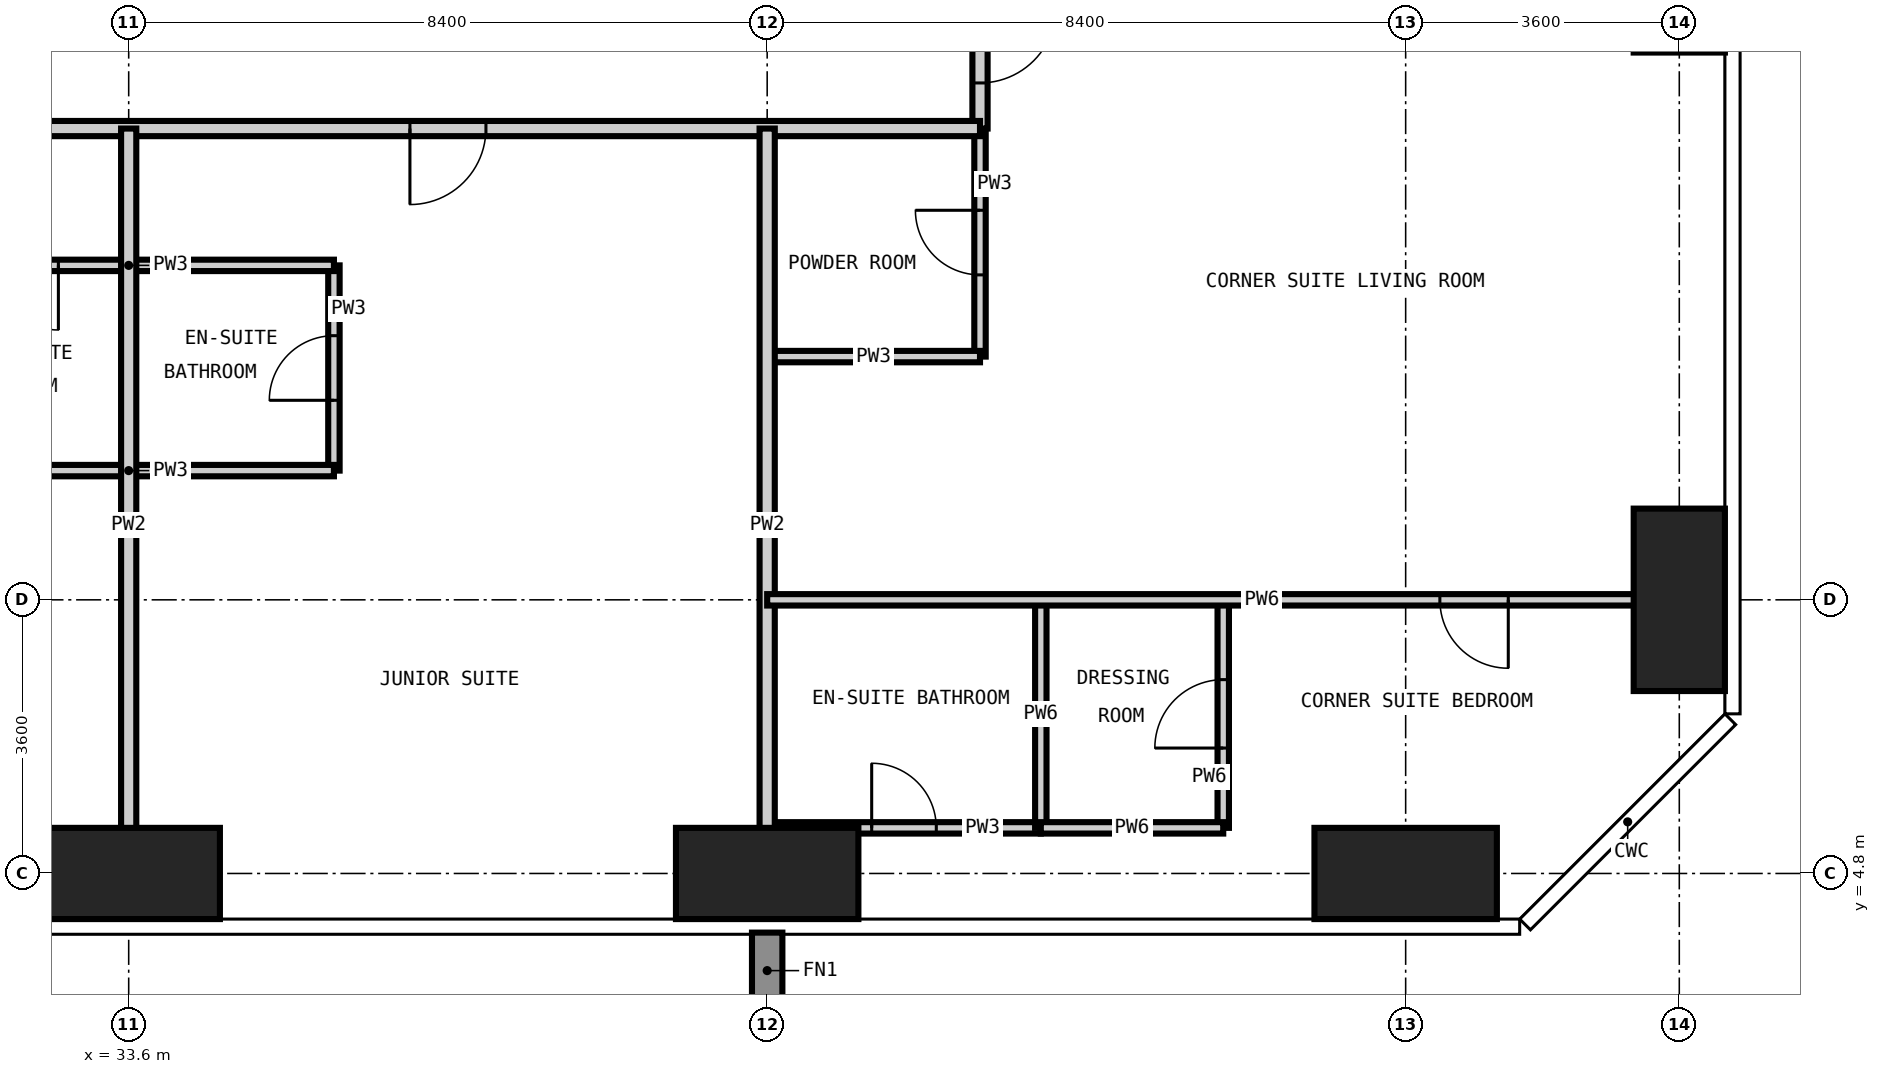
"""IFC4 building model, lengths in metres.
Left out: names, types, materials, properties, quantities, classifications, styles, units other than length and angle.
Written with IfcOpenShell. Run it as: python <this file> out.ifc"""

import sys

from ifc_helpers import new_model, si_unit, direction, frame, frame_2d, origin, origin_2d, place, context, subcontext, project, spatial, rectangle, extrude, element, fill, save


model = new_model("IFC4")
c1 = context("Model", 3, precision=1e-05, world=origin(), true_north=direction((0.0, 1.0)))
c2 = subcontext(c1, "Body", "Model", "MODEL_VIEW")
j1 = project(units=[si_unit("LENGTHUNIT", "METRE"), si_unit("PLANEANGLEUNIT", "RADIAN")], contexts=[c1])
p1 = place(None, origin())
s1 = spatial("IfcSite", under=j1, at=p1, CompositionType="ELEMENT")
p2 = place(p1, origin())
s2 = spatial("IfcBuilding", under=s1, at=p2, CompositionType="ELEMENT")
p3 = place(p2, frame((0.0, 0.0, 205.8)))
s3 = spatial("IfcBuildingStorey", under=s2, at=p3, CompositionType="ELEMENT", Elevation=205.8)
for number, where, z_axis, x_axis in (
    (1, (33.6, 4.8, -0.35), (0.0, 0.0, 1.0), (1.0, 0.0, 0.0)),
    (2, (42.0, 4.8, -0.35), (0.0, 0.0, 1.0), (1.0, 0.0, 0.0)),
    (3, (50.4, 4.8, -0.35), (0.0, 0.0, 1.0), (1.0, 0.0, 0.0)),
):
    element("IfcColumn", number, at=place(p3, frame(where, z_axis=z_axis, x_axis=x_axis)), inside=s3, PredefinedType="COLUMN", context=c2, shape_type="SweptSolid", body=[
        extrude(rectangle(XDim=2.4, YDim=1.2, at=origin_2d()), origin(), (0.0, 0.0, 1.0), 3.6),
    ])
p4 = place(p3, frame((54.0, 8.4, -0.35), z_axis=(0.0, 0.0, 1.0), x_axis=(1.0, 0.0, 0.0)))
e4 = element("IfcColumn", 4, at=p4, inside=s3, PredefinedType="COLUMN", context=c2, shape_type="SweptSolid", body=[
    extrude(rectangle(XDim=1.2, YDim=2.4, at=origin_2d()), origin(), (0.0, 0.0, 1.0), 3.6),
])
p5 = place(p3, frame((36.3, 10.1, 0.0), z_axis=(0.0, 0.0, 1.0), x_axis=(0.0, 1.0, 0.0)))
e5 = element("IfcWall", 5, at=p5, inside=s3, PredefinedType="PARTITIONING", context=c2, shape_type="SweptSolid", body=[
    extrude(rectangle(XDim=2.7, YDim=0.15, at=frame_2d((1.35, 0.0))), origin(), (0.0, 0.0, 1.0), 3.25),
])
p6 = place(p5, frame((0.925, 0.0, 0.0)))
e6 = element("IfcOpeningElement", 6, at=p6, cuts=e5, PredefinedType="OPENING", context=c2, shape_type="SweptSolid", body=[
    extrude(rectangle(XDim=0.85, YDim=2.1, at=frame_2d((0.425, 1.05))), frame((0.0, 0.085, 0.0), z_axis=(0.0, -1.0, 0.0), x_axis=(1.0, 0.0, 0.0)), (0.0, 0.0, 1.0), 0.17),
])
p7 = place(p3, frame((44.8, 11.6, 0.0), z_axis=(0.0, 0.0, 1.0), x_axis=(0.0, 1.0, 0.0)))
e7 = element("IfcWall", 7, at=p7, inside=s3, PredefinedType="PARTITIONING", context=c2, shape_type="SweptSolid", body=[
    extrude(rectangle(XDim=3.0, YDim=0.15, at=frame_2d((1.5, 0.0))), origin(), (0.0, 0.0, 1.0), 3.25),
])
p8 = place(p7, frame((1.075, 0.0, 0.0)))
e8 = element("IfcOpeningElement", 8, at=p8, cuts=e7, PredefinedType="OPENING", context=c2, shape_type="SweptSolid", body=[
    extrude(rectangle(XDim=0.85, YDim=2.1, at=frame_2d((0.425, 1.05))), frame((0.0, 0.085, 0.0), z_axis=(0.0, -1.0, 0.0), x_axis=(1.0, 0.0, 0.0)), (0.0, 0.0, 1.0), 0.17),
])
p9 = place(p3, frame((42.0, 5.4, 0.0), z_axis=(0.0, 0.0, 1.0), x_axis=(1.0, 0.0, 0.0)))
e9 = element("IfcWall", 9, at=p9, inside=s3, PredefinedType="PARTITIONING", context=c2, shape_type="SweptSolid", body=[
    extrude(rectangle(XDim=3.6, YDim=0.15, at=frame_2d((1.8, 0.0))), origin(), (0.0, 0.0, 1.0), 3.25),
])
p10 = place(p9, frame((1.375, 0.0, 0.0)))
e10 = element("IfcOpeningElement", 10, at=p10, cuts=e9, PredefinedType="OPENING", context=c2, shape_type="SweptSolid", body=[
    extrude(rectangle(XDim=0.85, YDim=2.1, at=frame_2d((0.425, 1.05))), frame((0.0, 0.085, 0.0), z_axis=(0.0, -1.0, 0.0), x_axis=(1.0, 0.0, 0.0)), (0.0, 0.0, 1.0), 0.17),
])
p11 = place(p3, frame((30.9, 10.1, 0.0), z_axis=(0.0, 0.0, 1.0), x_axis=(1.0, 0.0, 0.0)))
e11 = element("IfcWall", 11, at=p11, inside=s3, PredefinedType="PARTITIONING", context=c2, shape_type="SweptSolid", body=[
    extrude(rectangle(XDim=5.4, YDim=0.15, at=frame_2d((2.7, 0.0))), origin(), (0.0, 0.0, 1.0), 3.25),
])
p12 = place(p3, frame((42.0, 11.6, 0.0), z_axis=(0.0, 0.0, 1.0), x_axis=(1.0, 0.0, 0.0)))
e12 = element("IfcWall", 12, at=p12, inside=s3, PredefinedType="PARTITIONING", context=c2, shape_type="SweptSolid", body=[
    extrude(rectangle(XDim=2.8, YDim=0.15, at=frame_2d((1.4, 0.0))), origin(), (0.0, 0.0, 1.0), 3.25),
])
p13 = place(p3, frame((30.9, 12.8, 0.0), z_axis=(0.0, 0.0, 1.0), x_axis=(1.0, 0.0, 0.0)))
e13 = element("IfcWall", 13, at=p13, inside=s3, PredefinedType="PARTITIONING", context=c2, shape_type="SweptSolid", body=[
    extrude(rectangle(XDim=5.4, YDim=0.15, at=frame_2d((2.7, 0.0))), origin(), (0.0, 0.0, 1.0), 3.25),
])
p14 = place(p13, frame((0.925, 0.0, 0.0)))
e14 = element("IfcOpeningElement", 14, at=p14, cuts=e13, PredefinedType="OPENING", context=c2, shape_type="SweptSolid", body=[
    extrude(rectangle(XDim=0.85, YDim=2.1, at=frame_2d((0.425, 1.05))), frame((0.0, 0.085, 0.0), z_axis=(0.0, -1.0, 0.0), x_axis=(1.0, 0.0, 0.0)), (0.0, 0.0, 1.0), 0.17),
])
p15 = place(p3, frame((44.8, 45.4, 0.0), z_axis=(0.0, 0.0, 1.0), x_axis=(0.0, -1.0, 0.0)))
e15 = element("IfcWall", 15, at=p15, inside=s3, PredefinedType="PARTITIONING", context=c2, shape_type="SweptSolid", body=[
    extrude(rectangle(XDim=30.8, YDim=0.2, at=frame_2d((15.4, 0.0))), origin(), (0.0, 0.0, 1.0), 3.25),
])
p16 = place(p15, frame((26.0, 0.0, 0.0)))
e16 = element("IfcOpeningElement", 16, at=p16, cuts=e15, PredefinedType="OPENING", context=c2, shape_type="SweptSolid", body=[
    extrude(rectangle(XDim=1.0, YDim=2.2, at=frame_2d((0.5, 1.1))), frame((0.0, 0.11, 0.0), z_axis=(0.0, -1.0, 0.0), x_axis=(1.0, 0.0, 0.0)), (0.0, 0.0, 1.0), 0.22),
])
p17 = place(p15, frame((21.8, 0.0, 0.0)))
e17 = element("IfcOpeningElement", 17, at=p17, cuts=e15, PredefinedType="OPENING", context=c2, shape_type="SweptSolid", body=[
    extrude(rectangle(XDim=1.0, YDim=2.2, at=frame_2d((0.5, 1.1))), frame((0.0, 0.11, 0.0), z_axis=(0.0, -1.0, 0.0), x_axis=(1.0, 0.0, 0.0)), (0.0, 0.0, 1.0), 0.22),
])
p18 = place(p15, frame((16.7, 0.0, 0.0)))
e18 = element("IfcOpeningElement", 18, at=p18, cuts=e15, PredefinedType="OPENING", context=c2, shape_type="SweptSolid", body=[
    extrude(rectangle(XDim=1.0, YDim=2.2, at=frame_2d((0.5, 1.1))), frame((0.0, 0.11, 0.0), z_axis=(0.0, -1.0, 0.0), x_axis=(1.0, 0.0, 0.0)), (0.0, 0.0, 1.0), 0.22),
])
p19 = place(p15, frame((5.0, 0.0, 0.0)))
e19 = element("IfcOpeningElement", 19, at=p19, cuts=e15, PredefinedType="OPENING", context=c2, shape_type="SweptSolid", body=[
    extrude(rectangle(XDim=1.0, YDim=2.2, at=frame_2d((0.5, 1.1))), frame((0.0, 0.11, 0.0), z_axis=(0.0, -1.0, 0.0), x_axis=(1.0, 0.0, 0.0)), (0.0, 0.0, 1.0), 0.22),
])
p20 = place(p15, frame((29.2, 0.0, 0.0)))
e20 = element("IfcOpeningElement", 20, at=p20, cuts=e15, PredefinedType="OPENING", context=c2, shape_type="SweptSolid", body=[
    extrude(rectangle(XDim=1.0, YDim=2.2, at=frame_2d((0.5, 1.1))), frame((0.0, 0.11, 0.0), z_axis=(0.0, -1.0, 0.0), x_axis=(1.0, 0.0, 0.0)), (0.0, 0.0, 1.0), 0.22),
])
p21 = place(p15, frame((1.2, 0.0, 0.0)))
e21 = element("IfcOpeningElement", 21, at=p21, cuts=e15, PredefinedType="OPENING", context=c2, shape_type="SweptSolid", body=[
    extrude(rectangle(XDim=1.0, YDim=2.2, at=frame_2d((0.5, 1.1))), frame((0.0, 0.11, 0.0), z_axis=(0.0, -1.0, 0.0), x_axis=(1.0, 0.0, 0.0)), (0.0, 0.0, 1.0), 0.22),
])
p22 = place(p3, frame((44.8, 14.6, 0.0), z_axis=(0.0, 0.0, 1.0), x_axis=(-1.0, 0.0, 0.0)))
e22 = element("IfcWall", 22, at=p22, inside=s3, PredefinedType="PARTITIONING", context=c2, shape_type="SweptSolid", body=[
    extrude(rectangle(XDim=30.2, YDim=0.2, at=frame_2d((15.1, 0.0))), origin(), (0.0, 0.0, 1.0), 3.25),
])
p23 = place(p22, frame((24.5, 0.0, 0.0)))
e23 = element("IfcOpeningElement", 23, at=p23, cuts=e22, PredefinedType="OPENING", context=c2, shape_type="SweptSolid", body=[
    extrude(rectangle(XDim=1.0, YDim=2.2, at=frame_2d((0.5, 1.1))), frame((0.0, 0.11, 0.0), z_axis=(0.0, -1.0, 0.0), x_axis=(1.0, 0.0, 0.0)), (0.0, 0.0, 1.0), 0.22),
])
p24 = place(p22, frame((12.8, 0.0, 0.0)))
e24 = element("IfcOpeningElement", 24, at=p24, cuts=e22, PredefinedType="OPENING", context=c2, shape_type="SweptSolid", body=[
    extrude(rectangle(XDim=1.0, YDim=2.2, at=frame_2d((0.5, 1.1))), frame((0.0, 0.11, 0.0), z_axis=(0.0, -1.0, 0.0), x_axis=(1.0, 0.0, 0.0)), (0.0, 0.0, 1.0), 0.22),
])
p25 = place(p22, frame((6.5, 0.0, 0.0)))
e25 = element("IfcOpeningElement", 25, at=p25, cuts=e22, PredefinedType="OPENING", context=c2, shape_type="SweptSolid", body=[
    extrude(rectangle(XDim=1.0, YDim=2.2, at=frame_2d((0.5, 1.1))), frame((0.0, 0.11, 0.0), z_axis=(0.0, -1.0, 0.0), x_axis=(1.0, 0.0, 0.0)), (0.0, 0.0, 1.0), 0.22),
])
for number, where, z_axis, x_axis in (
    (26, (33.6, 4.182, 0.0), (0.0, 0.0, 1.0), (0.0, 1.0, 0.0)),
    (27, (42.0, 4.182, 0.0), (0.0, 0.0, 1.0), (0.0, 1.0, 0.0)),
):
    element("IfcWall", number, at=place(p3, frame(where, z_axis=z_axis, x_axis=x_axis)), inside=s3, PredefinedType="PARTITIONING", context=c2, shape_type="SweptSolid", body=[
        extrude(rectangle(XDim=10.418, YDim=0.2, at=frame_2d((5.209, 0.0))), origin(), (0.0, 0.0, 1.0), 3.25),
    ])
p26 = place(p3, frame((45.6, 5.4, 0.0), z_axis=(0.0, 0.0, 1.0), x_axis=(0.0, 1.0, 0.0)))
e28 = element("IfcWall", 28, at=p26, inside=s3, PredefinedType="PARTITIONING", context=c2, shape_type="SweptSolid", body=[
    extrude(rectangle(XDim=3.0, YDim=0.15, at=frame_2d((1.5, 0.0))), origin(), (0.0, 0.0, 1.0), 3.25),
])
p27 = place(p3, frame((48.0, 5.4, 0.0), z_axis=(0.0, 0.0, 1.0), x_axis=(0.0, 1.0, 0.0)))
e29 = element("IfcWall", 29, at=p27, inside=s3, PredefinedType="PARTITIONING", context=c2, shape_type="SweptSolid", body=[
    extrude(rectangle(XDim=3.0, YDim=0.15, at=frame_2d((1.5, 0.0))), origin(), (0.0, 0.0, 1.0), 3.25),
])
p28 = place(p27, frame((1.05, 0.0, 0.0)))
e30 = element("IfcOpeningElement", 30, at=p28, cuts=e29, PredefinedType="OPENING", context=c2, shape_type="SweptSolid", body=[
    extrude(rectangle(XDim=0.9, YDim=2.1, at=frame_2d((0.45, 1.05))), frame((0.0, 0.085, 0.0), z_axis=(0.0, -1.0, 0.0), x_axis=(1.0, 0.0, 0.0)), (0.0, 0.0, 1.0), 0.17),
])
p29 = place(p3, frame((45.6, 5.4, 0.0), z_axis=(0.0, 0.0, 1.0), x_axis=(1.0, 0.0, 0.0)))
e31 = element("IfcWall", 31, at=p29, inside=s3, PredefinedType="PARTITIONING", context=c2, shape_type="SweptSolid", body=[
    extrude(rectangle(XDim=2.4, YDim=0.15, at=frame_2d((1.2, 0.0))), origin(), (0.0, 0.0, 1.0), 3.25),
])
p30 = place(p3, frame((42.0, 8.4, 0.0), z_axis=(0.0, 0.0, 1.0), x_axis=(1.0, 0.0, 0.0)))
e32 = element("IfcWall", 32, at=p30, inside=s3, PredefinedType="PARTITIONING", context=c2, shape_type="SweptSolid", body=[
    extrude(rectangle(XDim=12.618, YDim=0.15, at=frame_2d((6.309, 0.0))), origin(), (0.0, 0.0, 1.0), 3.25),
])
p31 = place(p30, frame((8.85, 0.0, 0.0)))
e33 = element("IfcOpeningElement", 33, at=p31, cuts=e32, PredefinedType="OPENING", context=c2, shape_type="SweptSolid", body=[
    extrude(rectangle(XDim=0.9, YDim=2.1, at=frame_2d((0.45, 1.05))), frame((0.0, 0.085, 0.0), z_axis=(0.0, -1.0, 0.0), x_axis=(1.0, 0.0, 0.0)), (0.0, 0.0, 1.0), 0.17),
])
p32 = place(p14, frame((0.85, 0.0, 0.0), z_axis=(0.0, 0.0, 1.0), x_axis=(-1.0, 0.0, 0.0)))
e34 = element("IfcDoor", 34, at=p32, inside=s3, OperationType="SINGLE_SWING_LEFT", PredefinedType="DOOR", context=c2, shape_type="SweptSolid", body=[
    extrude(rectangle(XDim=0.85, YDim=2.1, at=frame_2d((0.425, 1.05))), frame((0.0, 0.025, 0.0), z_axis=(0.0, -1.0, 0.0), x_axis=(1.0, 0.0, 0.0)), (0.0, 0.0, 1.0), 0.05),
])
fill(e14, e34)
p33 = place(p25, origin())
e35 = element("IfcDoor", 35, at=p33, inside=s3, OperationType="SINGLE_SWING_RIGHT", PredefinedType="DOOR", context=c2, shape_type="SweptSolid", body=[
    extrude(rectangle(XDim=1.0, YDim=2.2, at=frame_2d((0.5, 1.1))), frame((0.0, 0.025, 0.0), z_axis=(0.0, -1.0, 0.0), x_axis=(1.0, 0.0, 0.0)), (0.0, 0.0, 1.0), 0.05),
])
fill(e25, e35)
p34 = place(p6, origin())
e36 = element("IfcDoor", 36, at=p34, inside=s3, OperationType="SINGLE_SWING_LEFT", PredefinedType="DOOR", context=c2, shape_type="SweptSolid", body=[
    extrude(rectangle(XDim=0.85, YDim=2.1, at=frame_2d((0.425, 1.05))), frame((0.0, 0.025, 0.0), z_axis=(0.0, -1.0, 0.0), x_axis=(1.0, 0.0, 0.0)), (0.0, 0.0, 1.0), 0.05),
])
fill(e6, e36)
p35 = place(p20, origin())
e37 = element("IfcDoor", 37, at=p35, inside=s3, OperationType="SINGLE_SWING_LEFT", PredefinedType="DOOR", context=c2, shape_type="SweptSolid", body=[
    extrude(rectangle(XDim=1.0, YDim=2.2, at=frame_2d((0.5, 1.1))), frame((0.0, 0.025, 0.0), z_axis=(0.0, -1.0, 0.0), x_axis=(1.0, 0.0, 0.0)), (0.0, 0.0, 1.0), 0.05),
])
fill(e20, e37)
p36 = place(p8, origin())
e38 = element("IfcDoor", 38, at=p36, inside=s3, OperationType="SINGLE_SWING_RIGHT", PredefinedType="DOOR", context=c2, shape_type="SweptSolid", body=[
    extrude(rectangle(XDim=0.85, YDim=2.1, at=frame_2d((0.425, 1.05))), frame((0.0, 0.025, 0.0), z_axis=(0.0, -1.0, 0.0), x_axis=(1.0, 0.0, 0.0)), (0.0, 0.0, 1.0), 0.05),
])
fill(e8, e38)
p37 = place(p31, frame((0.9, 0.0, 0.0), z_axis=(0.0, 0.0, 1.0), x_axis=(-1.0, 0.0, 0.0)))
e39 = element("IfcDoor", 39, at=p37, inside=s3, OperationType="SINGLE_SWING_LEFT", PredefinedType="DOOR", context=c2, shape_type="SweptSolid", body=[
    extrude(rectangle(XDim=0.9, YDim=2.1, at=frame_2d((0.45, 1.05))), frame((0.0, 0.025, 0.0), z_axis=(0.0, -1.0, 0.0), x_axis=(1.0, 0.0, 0.0)), (0.0, 0.0, 1.0), 0.05),
])
fill(e33, e39)
p38 = place(p10, origin())
e40 = element("IfcDoor", 40, at=p38, inside=s3, OperationType="SINGLE_SWING_LEFT", PredefinedType="DOOR", context=c2, shape_type="SweptSolid", body=[
    extrude(rectangle(XDim=0.85, YDim=2.1, at=frame_2d((0.425, 1.05))), frame((0.0, 0.025, 0.0), z_axis=(0.0, -1.0, 0.0), x_axis=(1.0, 0.0, 0.0)), (0.0, 0.0, 1.0), 0.05),
])
fill(e10, e40)
p39 = place(p28, origin())
e41 = element("IfcDoor", 41, at=p39, inside=s3, OperationType="SINGLE_SWING_LEFT", PredefinedType="DOOR", context=c2, shape_type="SweptSolid", body=[
    extrude(rectangle(XDim=0.9, YDim=2.1, at=frame_2d((0.45, 1.05))), frame((0.0, 0.025, 0.0), z_axis=(0.0, -1.0, 0.0), x_axis=(1.0, 0.0, 0.0)), (0.0, 0.0, 1.0), 0.05),
])
fill(e30, e41)
save(model, sys.argv[1])
